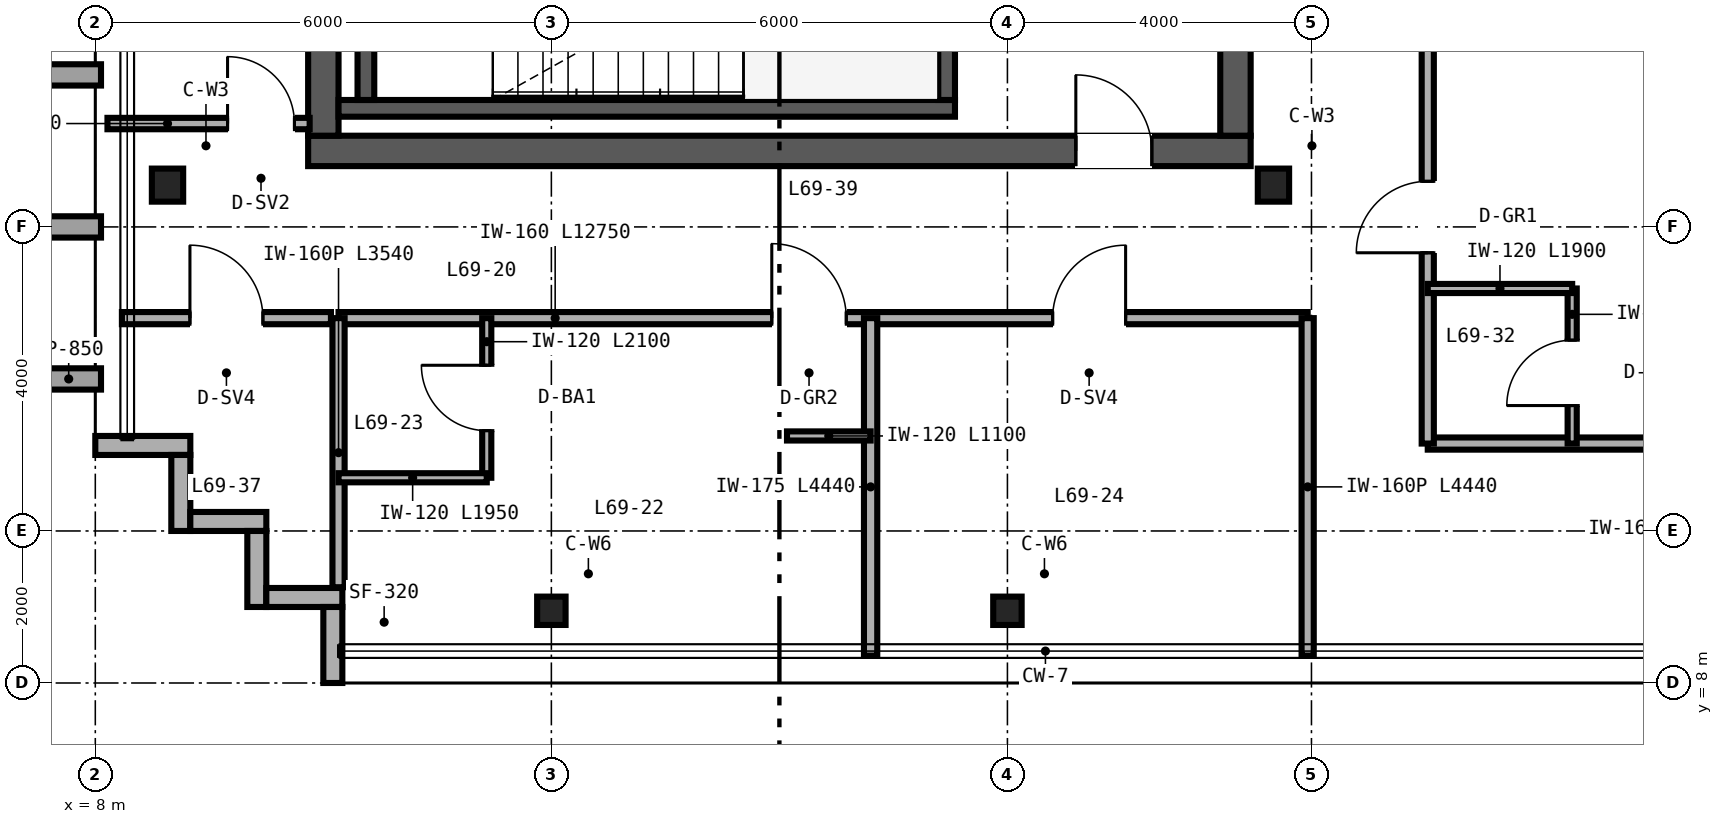
"""IFC4 building model, lengths in metres.
Left out: names, types, materials, properties, quantities, classifications, styles, units other than length and angle.
Written with IfcOpenShell. Run it as: python <this file> out.ifc"""

import sys

from ifc_helpers import new_model, si_unit, direction, frame, frame_2d, origin, origin_2d, place, context, subcontext, project, spatial, rectangle, i_section, extrude, source, transform, mapped, element, fill, save


model = new_model("IFC4")
c1 = context("Model", 3, precision=1e-05, world=origin(), true_north=direction((0.0, 1.0)))
c2 = subcontext(c1, "Body", "Model", "MODEL_VIEW")
j1 = project(units=[si_unit("LENGTHUNIT", "METRE"), si_unit("PLANEANGLEUNIT", "RADIAN")], contexts=[c1])
p1 = place(None, origin())
s1 = spatial("IfcSite", under=j1, at=p1, CompositionType="ELEMENT")
p2 = place(p1, origin())
s2 = spatial("IfcBuilding", under=s1, at=p2, CompositionType="ELEMENT")
p3 = place(p2, frame((0.0, 0.0, 272.4)))
s3 = spatial("IfcBuildingStorey", under=s2, at=p3, CompositionType="ELEMENT", Elevation=272.4)
p4 = place(p3, frame((10.8, 15.0, 0.0), z_axis=(0.0, 0.0, 1.0), x_axis=(1.0, 0.0, 0.0)))
e1 = element("IfcWall", 1, at=p4, inside=s3, PredefinedType="SHEAR", context=c2, shape_type="SweptSolid", body=[
    extrude(rectangle(XDim=12.4, YDim=0.4, at=frame_2d((6.2, 0.0))), origin(), (0.0, 0.0, 1.0), 3.38),
])
p5 = place(p4, frame((10.1, 0.0, 0.0)))
e2 = element("IfcOpeningElement", 2, at=p5, cuts=e1, PredefinedType="OPENING", context=c2, shape_type="SweptSolid", body=[
    extrude(rectangle(XDim=1.0, YDim=2.15, at=frame_2d((0.5, 1.075))), frame((0.0, 0.21, 0.0), z_axis=(0.0, -1.0, 0.0), x_axis=(1.0, 0.0, 0.0)), (0.0, 0.0, 1.0), 0.42),
])
for number, where, z_axis, x_axis in (
    (3, (11.0, 15.2, 0.0), (0.0, 0.0, 1.0), (0.0, 1.0, 0.0)),
    (4, (23.0, 15.2, 0.0), (0.0, 0.0, 1.0), (0.0, 1.0, 0.0)),
):
    element("IfcWall", number, at=place(p3, frame(where, z_axis=z_axis, x_axis=x_axis)), inside=s3, PredefinedType="SHEAR", context=c2, shape_type="SweptSolid", body=[
        extrude(rectangle(XDim=21.6, YDim=0.4, at=frame_2d((10.8, 0.0))), origin(), (0.0, 0.0, 1.0), 3.38),
    ])
p6 = place(p3, frame((11.2, 15.56, 0.0), z_axis=(0.0, 0.0, 1.0), x_axis=(1.0, 0.0, 0.0)))
e5 = element("IfcWall", 5, at=p6, inside=s3, PredefinedType="SHEAR", context=c2, shape_type="SweptSolid", body=[
    extrude(rectangle(XDim=8.11, YDim=0.22, at=frame_2d((4.055, 0.0))), origin(), (0.0, 0.0, 1.0), 3.4),
])
for number, where, z_axis, x_axis in (
    (6, (11.56, 15.67, 0.0), (0.0, 0.0, 1.0), (0.0, 1.0, 0.0)),
    (7, (19.2, 15.67, 0.0), (0.0, 0.0, 1.0), (0.0, 1.0, 0.0)),
):
    element("IfcWall", number, at=place(p3, frame(where, z_axis=z_axis, x_axis=x_axis)), inside=s3, PredefinedType="SHEAR", context=c2, shape_type="SweptSolid", body=[
        extrude(rectangle(XDim=3.28, YDim=0.22, at=frame_2d((1.64, 0.0))), origin(), (0.0, 0.0, 1.0), 3.4),
    ])
m1 = source(origin(), c2, "Body", "SweptSolid", [
    extrude(i_section(OverallWidth=0.412, OverallDepth=0.435, WebThickness=0.036, FlangeThickness=0.057, FilletRadius=0.025, at=origin_2d()), origin(), (0.0, 0.0, 1.0), 3.38),
])
for number, where, z_axis, x_axis in (
    (8, (8.95, 14.55, 0.0), (0.0, 0.0, 1.0), (1.0, 0.0, 0.0)),
    (9, (23.5, 14.55, 0.0), (0.0, 0.0, 1.0), (1.0, 0.0, 0.0)),
):
    element("IfcColumn", number, at=place(p3, frame(where, z_axis=z_axis, x_axis=x_axis)), inside=s3, PredefinedType="COLUMN", context=c2, shape_type="MappedRepresentation", body=[
        mapped(m1, transform((0.0, 0.0, 0.0), scale=1.0)),
    ])
m2 = source(origin(), c2, "Body", "SweptSolid", [
    extrude(i_section(OverallWidth=0.374, OverallDepth=0.373, WebThickness=0.016, FlangeThickness=0.026, FilletRadius=0.025, at=origin_2d()), origin(), (0.0, 0.0, 1.0), 3.38),
])
for number, where, z_axis, x_axis in (
    (10, (14.0, 8.95, 0.0), (0.0, 0.0, 1.0), (1.0, 0.0, 0.0)),
    (11, (20.0, 8.95, 0.0), (0.0, 0.0, 1.0), (1.0, 0.0, 0.0)),
):
    element("IfcColumn", number, at=place(p3, frame(where, z_axis=z_axis, x_axis=x_axis)), inside=s3, PredefinedType="COLUMN", context=c2, shape_type="MappedRepresentation", body=[
        mapped(m2, transform((0.0, 0.0, 0.0), scale=1.0)),
    ])
p7 = place(p3, frame((8.0, 11.125, 0.0), z_axis=(0.0, 0.0, 1.0), x_axis=(1.0, 0.0, 0.0)))
e12 = element("IfcWall", 12, at=p7, inside=s3, PredefinedType="SOLIDWALL", context=c2, shape_type="SweptSolid", body=[
    extrude(rectangle(XDim=1.25, YDim=0.25, at=frame_2d((0.625, 0.0))), origin(), (0.0, 0.0, 1.0), 3.38),
])
for number, where, z_axis, x_axis in (
    (13, (9.125, 11.0, 0.0), (0.0, 0.0, 1.0), (0.0, -1.0, 0.0)),
    (14, (9.25, 10.125, 0.0), (0.0, 0.0, 1.0), (1.0, 0.0, 0.0)),
    (15, (10.125, 10.0, 0.0), (0.0, 0.0, 1.0), (0.0, -1.0, 0.0)),
    (16, (10.25, 9.125, 0.0), (0.0, 0.0, 1.0), (1.0, 0.0, 0.0)),
    (17, (11.125, 9.0, 0.0), (0.0, 0.0, 1.0), (0.0, -1.0, 0.0)),
):
    element("IfcWall", number, at=place(p3, frame(where, z_axis=z_axis, x_axis=x_axis)), inside=s3, PredefinedType="SOLIDWALL", context=c2, shape_type="SweptSolid", body=[
        extrude(rectangle(XDim=1.0, YDim=0.25, at=frame_2d((0.5, 0.0))), origin(), (0.0, 0.0, 1.0), 3.38),
    ])
p8 = place(p3, frame((11.2, 12.8, 0.0), z_axis=(0.0, 0.0, 1.0), x_axis=(1.0, 0.0, 0.0)))
e18 = element("IfcWall", 18, at=p8, inside=s3, PredefinedType="PARTITIONING", context=c2, shape_type="SweptSolid", body=[
    extrude(rectangle(XDim=12.75, YDim=0.16, at=frame_2d((6.375, 0.0))), origin(), (0.0, 0.0, 1.0), 3.38),
])
p9 = place(p8, frame((5.7, 0.0, 0.0)))
e19 = element("IfcOpeningElement", 19, at=p9, cuts=e18, PredefinedType="OPENING", context=c2, shape_type="SweptSolid", body=[
    extrude(rectangle(XDim=0.98, YDim=2.2, at=frame_2d((0.49, 1.1))), frame((0.0, 0.09, 0.0), z_axis=(0.0, -1.0, 0.0), x_axis=(1.0, 0.0, 0.0)), (0.0, 0.0, 1.0), 0.18),
])
p10 = place(p8, frame((9.395, 0.0, 0.0)))
e20 = element("IfcOpeningElement", 20, at=p10, cuts=e18, PredefinedType="OPENING", context=c2, shape_type="SweptSolid", body=[
    extrude(rectangle(XDim=0.96, YDim=2.15, at=frame_2d((0.48, 1.075))), frame((0.0, 0.09, 0.0), z_axis=(0.0, -1.0, 0.0), x_axis=(1.0, 0.0, 0.0)), (0.0, 0.0, 1.0), 0.18),
])
p11 = place(p3, frame((11.2, 9.26, 0.0), z_axis=(0.0, 0.0, 1.0), x_axis=(0.0, 1.0, 0.0)))
e21 = element("IfcWall", 21, at=p11, inside=s3, PredefinedType="PARTITIONING", context=c2, shape_type="SweptSolid", body=[
    extrude(rectangle(XDim=3.54, YDim=0.16, at=frame_2d((1.77, 0.0))), origin(), (0.0, 0.0, 1.0), 3.38),
])
p12 = place(p3, frame((23.95, 8.36, 0.0), z_axis=(0.0, 0.0, 1.0), x_axis=(0.0, 1.0, 0.0)))
e22 = element("IfcWall", 22, at=p12, inside=s3, PredefinedType="PARTITIONING", context=c2, shape_type="SweptSolid", body=[
    extrude(rectangle(XDim=4.44, YDim=0.16, at=frame_2d((2.22, 0.0))), origin(), (0.0, 0.0, 1.0), 3.38),
])
p13 = place(p3, frame((18.2, 8.36, 0.0), z_axis=(0.0, 0.0, 1.0), x_axis=(0.0, 1.0, 0.0)))
e23 = element("IfcWall", 23, at=p13, inside=s3, PredefinedType="PARTITIONING", context=c2, shape_type="SweptSolid", body=[
    extrude(rectangle(XDim=4.44, YDim=0.175, at=frame_2d((2.22, 0.0))), origin(), (0.0, 0.0, 1.0), 2.687),
])
p14 = place(p3, frame((13.15, 10.7, 0.0), z_axis=(0.0, 0.0, 1.0), x_axis=(0.0, 1.0, 0.0)))
e24 = element("IfcWall", 24, at=p14, inside=s3, PredefinedType="PARTITIONING", context=c2, shape_type="SweptSolid", body=[
    extrude(rectangle(XDim=2.1, YDim=0.12, at=frame_2d((1.05, 0.0))), origin(), (0.0, 0.0, 1.0), 3.38),
])
p15 = place(p14, frame((0.62, 0.0, 0.0)))
e25 = element("IfcOpeningElement", 25, at=p15, cuts=e24, PredefinedType="OPENING", context=c2, shape_type="SweptSolid", body=[
    extrude(rectangle(XDim=0.86, YDim=2.1, at=frame_2d((0.43, 1.05))), frame((0.0, 0.07, 0.0), z_axis=(0.0, -1.0, 0.0), x_axis=(1.0, 0.0, 0.0)), (0.0, 0.0, 1.0), 0.14),
])
p16 = place(p3, frame((11.2, 10.7, 0.0), z_axis=(0.0, 0.0, 1.0), x_axis=(1.0, 0.0, 0.0)))
e26 = element("IfcWall", 26, at=p16, inside=s3, PredefinedType="PARTITIONING", context=c2, shape_type="SweptSolid", body=[
    extrude(rectangle(XDim=1.95, YDim=0.12, at=frame_2d((0.975, 0.0))), origin(), (0.0, 0.0, 1.0), 3.38),
])
p17 = place(p3, frame((17.1, 11.25, 0.0), z_axis=(0.0, 0.0, 1.0), x_axis=(1.0, 0.0, 0.0)))
e27 = element("IfcWall", 27, at=p17, inside=s3, PredefinedType="PARTITIONING", context=c2, shape_type="SweptSolid", body=[
    extrude(rectangle(XDim=1.1, YDim=0.12, at=frame_2d((0.55, 0.0))), origin(), (0.0, 0.0, 1.0), 3.38),
])
p18 = place(p3, frame((8.16, 15.36, 0.0), z_axis=(0.0, 0.0, 1.0), x_axis=(1.0, 0.0, 0.0)))
e28 = element("IfcWall", 28, at=p18, inside=s3, PredefinedType="PARTITIONING", context=c2, shape_type="SweptSolid", body=[
    extrude(rectangle(XDim=2.66, YDim=0.15, at=frame_2d((1.33, 0.0))), origin(), (0.0, 0.0, 1.0), 2.601),
])
p19 = place(p18, frame((1.58, 0.0, 0.0)))
e29 = element("IfcOpeningElement", 29, at=p19, cuts=e28, PredefinedType="OPENING", context=c2, shape_type="SweptSolid", body=[
    extrude(rectangle(XDim=0.88, YDim=2.15, at=frame_2d((0.44, 1.075))), frame((0.0, 0.085, 0.0), z_axis=(0.0, -1.0, 0.0), x_axis=(1.0, 0.0, 0.0)), (0.0, 0.0, 1.0), 0.17),
])
p20 = place(p3, frame((25.53, 11.15, 0.0), z_axis=(0.0, 0.0, 1.0), x_axis=(1.0, 0.0, 0.0)))
e30 = element("IfcWall", 30, at=p20, inside=s3, PredefinedType="PARTITIONING", context=c2, shape_type="SweptSolid", body=[
    extrude(rectangle(XDim=6.21, YDim=0.16, at=frame_2d((3.105, 0.0))), origin(), (0.0, 0.0, 1.0), 3.38),
])
p21 = place(p3, frame((25.53, 11.15, 0.0), z_axis=(0.0, 0.0, 1.0), x_axis=(0.0, 1.0, 0.0)))
e31 = element("IfcWall", 31, at=p21, inside=s3, PredefinedType="PARTITIONING", context=c2, shape_type="SweptSolid", body=[
    extrude(rectangle(XDim=29.7, YDim=0.16, at=frame_2d((14.85, 0.0))), origin(), (0.0, 0.0, 1.0), 2.524),
])
p22 = place(p21, frame((2.51, 0.0, 0.0)))
e32 = element("IfcOpeningElement", 32, at=p22, cuts=e31, PredefinedType="OPENING", context=c2, shape_type="SweptSolid", body=[
    extrude(rectangle(XDim=0.94, YDim=2.15, at=frame_2d((0.47, 1.075))), frame((0.0, 0.09, 0.0), z_axis=(0.0, -1.0, 0.0), x_axis=(1.0, 0.0, 0.0)), (0.0, 0.0, 1.0), 0.18),
])
p23 = place(p21, frame((12.56, 0.0, 0.0)))
e33 = element("IfcOpeningElement", 33, at=p23, cuts=e31, PredefinedType="OPENING", context=c2, shape_type="SweptSolid", body=[
    extrude(rectangle(XDim=0.94, YDim=2.15, at=frame_2d((0.47, 1.075))), frame((0.0, 0.09, 0.0), z_axis=(0.0, -1.0, 0.0), x_axis=(1.0, 0.0, 0.0)), (0.0, 0.0, 1.0), 0.18),
])
p24 = place(p21, frame((22.16, 0.0, 0.0)))
e34 = element("IfcOpeningElement", 34, at=p24, cuts=e31, PredefinedType="OPENING", context=c2, shape_type="SweptSolid", body=[
    extrude(rectangle(XDim=0.94, YDim=2.15, at=frame_2d((0.47, 1.075))), frame((0.0, 0.09, 0.0), z_axis=(0.0, -1.0, 0.0), x_axis=(1.0, 0.0, 0.0)), (0.0, 0.0, 1.0), 0.18),
])
p25 = place(p3, frame((27.43, 11.15, 0.0), z_axis=(0.0, 0.0, 1.0), x_axis=(0.0, 1.0, 0.0)))
e35 = element("IfcWall", 35, at=p25, inside=s3, PredefinedType="PARTITIONING", context=c2, shape_type="SweptSolid", body=[
    extrude(rectangle(XDim=2.04, YDim=0.12, at=frame_2d((1.02, 0.0))), origin(), (0.0, 0.0, 1.0), 3.38),
])
p26 = place(p25, frame((0.5, 0.0, 0.0)))
e36 = element("IfcOpeningElement", 36, at=p26, cuts=e35, PredefinedType="OPENING", context=c2, shape_type="SweptSolid", body=[
    extrude(rectangle(XDim=0.86, YDim=2.1, at=frame_2d((0.43, 1.05))), frame((0.0, 0.07, 0.0), z_axis=(0.0, -1.0, 0.0), x_axis=(1.0, 0.0, 0.0)), (0.0, 0.0, 1.0), 0.14),
])
p27 = place(p3, frame((25.53, 13.19, 0.0), z_axis=(0.0, 0.0, 1.0), x_axis=(1.0, 0.0, 0.0)))
e37 = element("IfcWall", 37, at=p27, inside=s3, PredefinedType="PARTITIONING", context=c2, shape_type="SweptSolid", body=[
    extrude(rectangle(XDim=1.9, YDim=0.12, at=frame_2d((0.95, 0.0))), origin(), (0.0, 0.0, 1.0), 3.38),
])
p28 = place(p3, frame((8.35, 12.8, 0.0), z_axis=(0.0, 0.0, 1.0), x_axis=(1.0, 0.0, 0.0)))
e38 = element("IfcWall", 38, at=p28, inside=s3, PredefinedType="PARTITIONING", context=c2, shape_type="SweptSolid", body=[
    extrude(rectangle(XDim=2.75, YDim=0.16, at=frame_2d((1.375, 0.0))), origin(), (0.0, 0.0, 1.0), 3.38),
])
p29 = place(p28, frame((0.895, 0.0, 0.0)))
e39 = element("IfcOpeningElement", 39, at=p29, cuts=e38, PredefinedType="OPENING", context=c2, shape_type="SweptSolid", body=[
    extrude(rectangle(XDim=0.96, YDim=2.15, at=frame_2d((0.48, 1.075))), frame((0.0, 0.09, 0.0), z_axis=(0.0, -1.0, 0.0), x_axis=(1.0, 0.0, 0.0)), (0.0, 0.0, 1.0), 0.18),
])
m3 = source(origin(), c2, "Body", "SweptSolid", [
    extrude(rectangle(XDim=1.0, YDim=2.15, at=frame_2d((0.5, 1.075))), frame((0.0, 0.025, 0.0), z_axis=(0.0, -1.0, 0.0), x_axis=(1.0, 0.0, 0.0)), (0.0, 0.0, 1.0), 0.05),
])
p30 = place(p5, origin())
e40 = element("IfcDoor", 40, at=p30, inside=s3, OperationType="SINGLE_SWING_LEFT", PredefinedType="DOOR", context=c2, shape_type="MappedRepresentation", body=[
    mapped(m3, transform((0.0, 0.0, 0.0), scale=1.0)),
])
fill(e2, e40)
m4 = source(origin(), c2, "Body", "SweptSolid", [
    extrude(rectangle(XDim=0.86, YDim=2.1, at=frame_2d((0.43, 1.05))), frame((0.0, 0.025, 0.0), z_axis=(0.0, -1.0, 0.0), x_axis=(1.0, 0.0, 0.0)), (0.0, 0.0, 1.0), 0.05),
])
p31 = place(p15, origin())
e41 = element("IfcDoor", 41, at=p31, inside=s3, OperationType="SINGLE_SWING_RIGHT", PredefinedType="DOOR", context=c2, shape_type="MappedRepresentation", body=[
    mapped(m4, transform((0.0, 0.0, 0.0), scale=1.0)),
])
fill(e25, e41)
m5 = source(origin(), c2, "Body", "SweptSolid", [
    extrude(rectangle(XDim=0.98, YDim=2.2, at=frame_2d((0.49, 1.1))), frame((0.0, 0.025, 0.0), z_axis=(0.0, -1.0, 0.0), x_axis=(1.0, 0.0, 0.0)), (0.0, 0.0, 1.0), 0.05),
])
p32 = place(p9, origin())
e42 = element("IfcDoor", 42, at=p32, inside=s3, OperationType="SINGLE_SWING_LEFT", PredefinedType="DOOR", context=c2, shape_type="MappedRepresentation", body=[
    mapped(m5, transform((0.0, 0.0, 0.0), scale=1.0)),
])
fill(e19, e42)
m6 = source(origin(), c2, "Body", "SweptSolid", [
    extrude(rectangle(XDim=0.96, YDim=2.15, at=frame_2d((0.48, 1.075))), frame((0.0, 0.025, 0.0), z_axis=(0.0, -1.0, 0.0), x_axis=(1.0, 0.0, 0.0)), (0.0, 0.0, 1.0), 0.05),
])
p33 = place(p10, origin())
e43 = element("IfcDoor", 43, at=p33, inside=s3, OperationType="SINGLE_SWING_RIGHT", PredefinedType="DOOR", context=c2, shape_type="MappedRepresentation", body=[
    mapped(m6, transform((0.0, 0.0, 0.0), scale=1.0)),
])
fill(e20, e43)
m7 = source(origin(), c2, "Body", "SweptSolid", [
    extrude(rectangle(XDim=0.88, YDim=2.15, at=frame_2d((0.44, 1.075))), frame((0.0, 0.025, 0.0), z_axis=(0.0, -1.0, 0.0), x_axis=(1.0, 0.0, 0.0)), (0.0, 0.0, 1.0), 0.05),
])
p34 = place(p19, origin())
e44 = element("IfcDoor", 44, at=p34, inside=s3, OperationType="SINGLE_SWING_LEFT", PredefinedType="DOOR", context=c2, shape_type="MappedRepresentation", body=[
    mapped(m7, transform((0.0, 0.0, 0.0), scale=1.0)),
])
fill(e29, e44)
p35 = place(p26, origin())
e45 = element("IfcDoor", 45, at=p35, inside=s3, OperationType="SINGLE_SWING_LEFT", PredefinedType="DOOR", context=c2, shape_type="MappedRepresentation", body=[
    mapped(m4, transform((0.0, 0.0, 0.0), scale=1.0)),
])
fill(e36, e45)
m8 = source(origin(), c2, "Body", "SweptSolid", [
    extrude(rectangle(XDim=0.94, YDim=2.15, at=frame_2d((0.47, 1.075))), frame((0.0, 0.025, 0.0), z_axis=(0.0, -1.0, 0.0), x_axis=(1.0, 0.0, 0.0)), (0.0, 0.0, 1.0), 0.05),
])
p36 = place(p22, origin())
e46 = element("IfcDoor", 46, at=p36, inside=s3, OperationType="SINGLE_SWING_LEFT", PredefinedType="DOOR", context=c2, shape_type="MappedRepresentation", body=[
    mapped(m8, transform((0.0, 0.0, 0.0), scale=1.0)),
])
fill(e32, e46)
p37 = place(p29, origin())
e47 = element("IfcDoor", 47, at=p37, inside=s3, OperationType="SINGLE_SWING_LEFT", PredefinedType="DOOR", context=c2, shape_type="MappedRepresentation", body=[
    mapped(m6, transform((0.0, 0.0, 0.0), scale=1.0)),
])
fill(e39, e47)
save(model, sys.argv[1])
